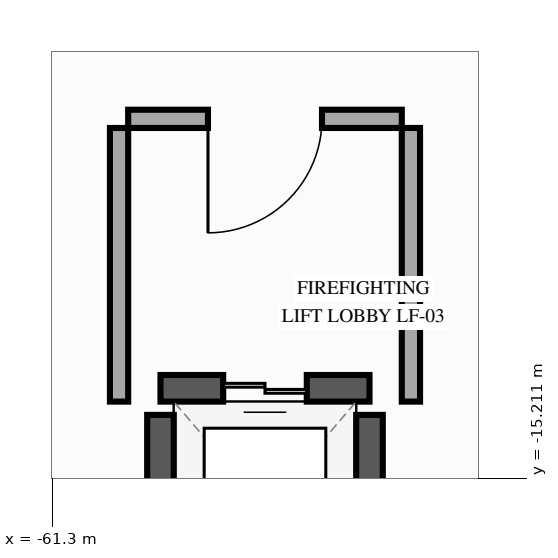
"""IFC4 building model, lengths in metres.
Left out: names, types, materials, properties, quantities, classifications, styles, units other than length and angle.
Written with IfcOpenShell. Run it as: python <this file> out.ifc"""

import sys

from ifc_helpers import new_model, si_unit, direction, frame, frame_2d, origin, place, context, subcontext, project, spatial, rectangle, extrude, element, fill, save


model = new_model("IFC4")
c1 = context("Model", 3, precision=1e-05, world=origin(), true_north=direction((0.0, 1.0)))
c2 = subcontext(c1, "Body", "Model", "MODEL_VIEW")
j1 = project(units=[si_unit("LENGTHUNIT", "METRE"), si_unit("PLANEANGLEUNIT", "RADIAN")], contexts=[c1])
p1 = place(None, origin())
s1 = spatial("IfcSite", under=j1, at=p1, CompositionType="ELEMENT")
p2 = place(p1, origin())
s2 = spatial("IfcBuilding", under=s1, at=p2, CompositionType="ELEMENT")
p3 = place(p2, frame((0.0, 0.0, 10.8)))
s3 = spatial("IfcBuildingStorey", under=s2, at=p3, CompositionType="ELEMENT", Elevation=10.8)
p4 = place(p3, frame((-57.125, -14.025, 0.0), z_axis=(0.0, 0.0, 1.0), x_axis=(-1.0, 0.0, 0.0)))
e1 = element("IfcWall", 1, at=p4, inside=s3, PredefinedType="SHEAR", context=c2, shape_type="SweptSolid", body=[
    extrude(rectangle(XDim=2.75, YDim=0.35, at=frame_2d((1.375, 0.0))), origin(), (0.0, 0.0, 1.0), 5.16),
])
p5 = place(p4, frame((0.825, 0.0, 0.0)))
e2 = element("IfcOpeningElement", 2, at=p5, cuts=e1, PredefinedType="OPENING", context=c2, shape_type="SweptSolid", body=[
    extrude(rectangle(XDim=1.1, YDim=2.2, at=frame_2d((0.55, 1.1))), frame((0.0, 0.185, 0.0), z_axis=(0.0, -1.0, 0.0), x_axis=(1.0, 0.0, 0.0)), (0.0, 0.0, 1.0), 0.37),
])
for number, where, z_axis, x_axis in (
    (3, (-59.875, -16.825, 0.0), (0.0, 0.0, 1.0), (0.0, 1.0, 0.0)),
    (4, (-57.125, -16.825, 0.0), (0.0, 0.0, 1.0), (0.0, 1.0, 0.0)),
):
    element("IfcWall", number, at=place(p3, frame(where, z_axis=z_axis, x_axis=x_axis)), inside=s3, PredefinedType="SHEAR", context=c2, shape_type="SweptSolid", body=[
        extrude(rectangle(XDim=2.45, YDim=0.35, at=frame_2d((1.225, 0.0))), origin(), (0.0, 0.0, 1.0), 5.16),
    ])
p6 = place(p3, frame((-56.7, -10.48, 0.0), z_axis=(0.0, 0.0, 1.0), x_axis=(-1.0, 0.0, 0.0)))
e5 = element("IfcWall", 5, at=p6, inside=s3, PredefinedType="PARTITIONING", context=c2, shape_type="SweptSolid", body=[
    extrude(rectangle(XDim=3.6, YDim=0.24, at=frame_2d((1.8, 0.0))), origin(), (0.0, 0.0, 1.0), 5.11),
])
p7 = place(p6, frame((1.05, 0.0, 0.0)))
e6 = element("IfcOpeningElement", 6, at=p7, cuts=e5, PredefinedType="OPENING", context=c2, shape_type="SweptSolid", body=[
    extrude(rectangle(XDim=1.5, YDim=2.2, at=frame_2d((0.75, 1.1))), frame((0.0, 0.13, 0.0), z_axis=(0.0, -1.0, 0.0), x_axis=(1.0, 0.0, 0.0)), (0.0, 0.0, 1.0), 0.26),
])
for number, where, z_axis, x_axis in (
    (7, (-60.42, -14.2, 0.0), (0.0, 0.0, 1.0), (0.0, 1.0, 0.0)),
    (8, (-56.58, -14.2, 0.0), (0.0, 0.0, 1.0), (0.0, 1.0, 0.0)),
):
    element("IfcWall", number, at=place(p3, frame(where, z_axis=z_axis, x_axis=x_axis)), inside=s3, PredefinedType="PARTITIONING", context=c2, shape_type="SweptSolid", body=[
        extrude(rectangle(XDim=3.6, YDim=0.24, at=frame_2d((1.8, 0.0))), origin(), (0.0, 0.0, 1.0), 4.745),
    ])
p8 = place(p5, origin())
e9 = element("IfcDoor", 9, at=p8, inside=s3, OperationType="DOUBLE_DOOR_SLIDING", PredefinedType="DOOR", context=c2, shape_type="SweptSolid", body=[
    extrude(rectangle(XDim=1.1, YDim=2.2, at=frame_2d((0.55, 1.1))), frame((0.0, 0.025, 0.0), z_axis=(0.0, -1.0, 0.0), x_axis=(1.0, 0.0, 0.0)), (0.0, 0.0, 1.0), 0.05),
])
fill(e2, e9)
p9 = place(p7, origin())
e10 = element("IfcDoor", 10, at=p9, inside=s3, OperationType="SINGLE_SWING_RIGHT", PredefinedType="DOOR", context=c2, shape_type="SweptSolid", body=[
    extrude(rectangle(XDim=1.5, YDim=2.2, at=frame_2d((0.75, 1.1))), frame((0.0, 0.025, 0.0), z_axis=(0.0, -1.0, 0.0), x_axis=(1.0, 0.0, 0.0)), (0.0, 0.0, 1.0), 0.05),
])
fill(e6, e10)
save(model, sys.argv[1])
